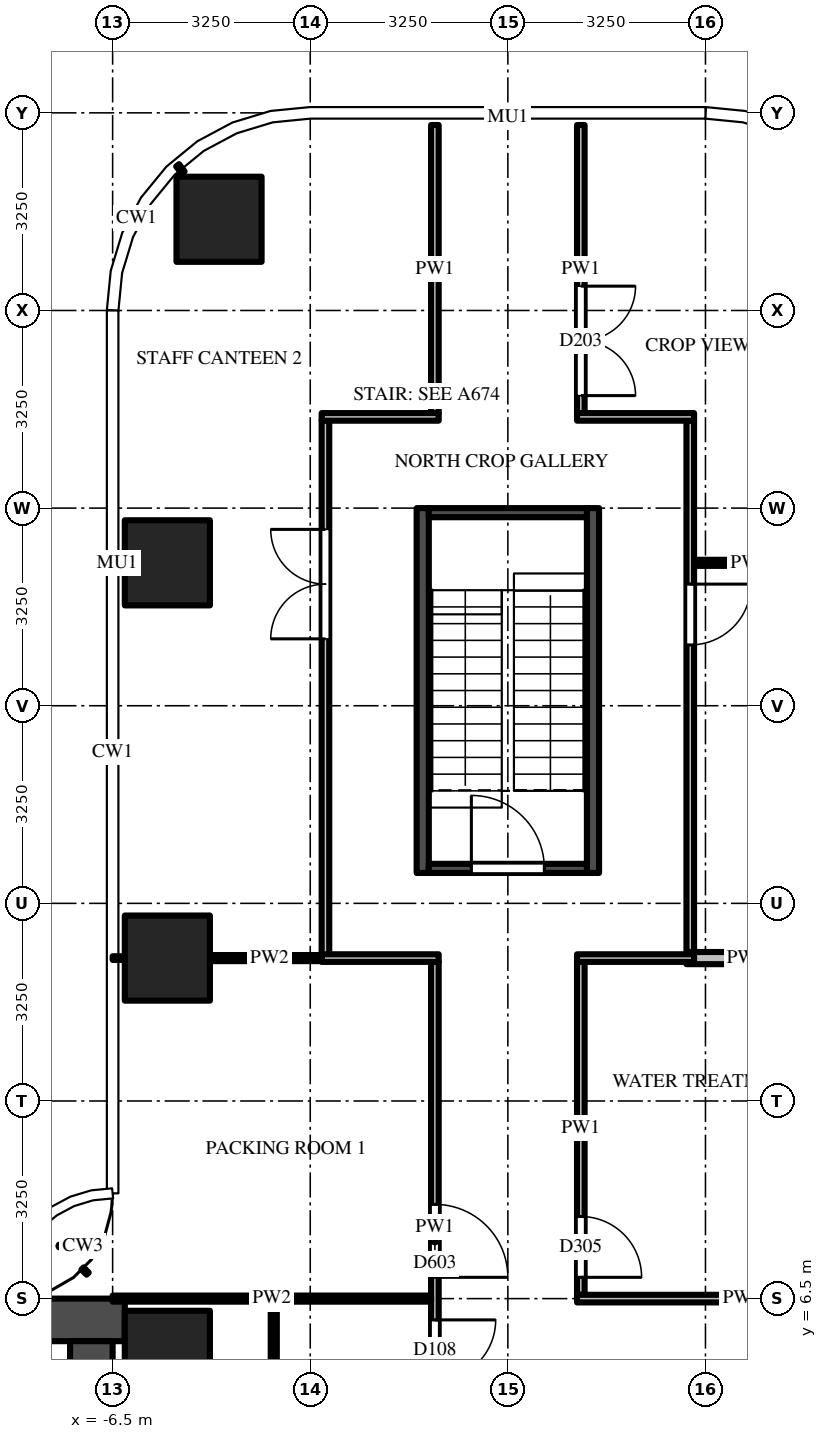
"""IFC4 building model, lengths in metres.
Left out: names, types, materials, properties, quantities, classifications, styles, units other than length and angle.
Written with IfcOpenShell. Run it as: python <this file> out.ifc"""

import sys

from ifc_helpers import new_model, si_unit, direction, frame, frame_2d, origin, origin_2d, place, context, subcontext, project, spatial, rectangle, extrude, source, transform, mapped, element, fill, save


model = new_model("IFC4")
c1 = context("Model", 3, precision=1e-05, world=origin(), true_north=direction((0.0, 1.0)))
c2 = subcontext(c1, "Body", "Model", "MODEL_VIEW")
j1 = project(units=[si_unit("LENGTHUNIT", "METRE"), si_unit("PLANEANGLEUNIT", "RADIAN")], contexts=[c1])
p1 = place(None, origin())
s1 = spatial("IfcSite", under=j1, at=p1, CompositionType="ELEMENT")
p2 = place(p1, origin())
s2 = spatial("IfcBuilding", under=s1, at=p2, CompositionType="ELEMENT")
p3 = place(p2, frame((0.0, 0.0, 79.0)))
s3 = spatial("IfcBuildingStorey", under=s2, at=p3, CompositionType="ELEMENT", Elevation=79.0)
m1 = source(origin(), c2, "Body", "SweptSolid", [
    extrude(rectangle(XDim=1.4, YDim=1.4, at=origin_2d()), origin(), (0.0, 0.0, 1.0), 4.5),
])
for number, where, z_axis, x_axis in (
    (1, (-5.6, 12.1, 0.0), (0.0, 0.0, 1.0), (1.0, 0.0, 0.0)),
    (2, (-5.6, 18.6, 0.0), (0.0, 0.0, 1.0), (1.0, 0.0, 0.0)),
    (3, (-4.75, 24.25, 0.0), (0.0, 0.0, 1.0), (1.0, 0.0, 0.0)),
    (4, (-5.6, 5.6, 0.0), (0.0, 0.0, 1.0), (1.0, 0.0, 0.0)),
):
    element("IfcColumn", number, at=place(p3, frame(where, z_axis=z_axis, x_axis=x_axis)), inside=s3, PredefinedType="COLUMN", context=c2, shape_type="MappedRepresentation", body=[
        mapped(m1, transform((0.0, 0.0, 0.0))),
    ])
m2 = source(origin(), c2, "Body", "SweptSolid", [
    extrude(rectangle(XDim=16.45, YDim=0.7, at=frame_2d((8.225, 0.0))), origin(), (0.0, 0.0, 1.0), 4.25),
])
p4 = place(p3, frame((-6.3, 6.15, 0.0), z_axis=(0.0, 0.0, 1.0), x_axis=(-1.0, 0.0, 0.0)))
e5 = element("IfcWall", 5, at=p4, inside=s3, PredefinedType="SHEAR", context=c2, shape_type="MappedRepresentation", body=[
    mapped(m2, transform((0.0, 0.0, 0.0))),
])
m3 = source(origin(), c2, "Body", "SweptSolid", [
    extrude(rectangle(XDim=9.05, YDim=0.7, at=frame_2d((4.525, 0.0))), origin(), (0.0, 0.0, 1.0), 4.25),
])
p5 = place(p3, frame((-6.85, 5.8, 0.0), z_axis=(0.0, 0.0, 1.0), x_axis=(0.0, -1.0, 0.0)))
e6 = element("IfcWall", 6, at=p5, inside=s3, PredefinedType="SHEAR", context=c2, shape_type="MappedRepresentation", body=[
    mapped(m3, transform((0.0, 0.0, 0.0))),
])
m4 = source(origin(), c2, "Body", "SweptSolid", [
    extrude(rectangle(XDim=1.8, YDim=2.1, at=frame_2d((0.9, 1.05))), frame((0.0, 0.36, 0.0), z_axis=(0.0, -1.0, 0.0), x_axis=(1.0, 0.0, 0.0)), (0.0, 0.0, 1.0), 0.72),
])
p6 = place(p5, frame((3.15, 0.0, 0.0)))
e7 = element("IfcOpeningElement", 7, at=p6, cuts=e6, PredefinedType="OPENING", context=c2, shape_type="MappedRepresentation", body=[
    mapped(m4, transform((0.0, 0.0, 0.0))),
])
m5 = source(origin(), c2, "Body", "SweptSolid", [
    extrude(rectangle(XDim=6.0, YDim=0.2, at=frame_2d((3.0, 0.0))), origin(), (0.0, 0.0, 1.0), 4.25),
])
for number, where, z_axis, x_axis in (
    (8, (-1.4, 13.5, 0.0), (0.0, 0.0, 1.0), (0.0, 1.0, 0.0)),
    (9, (1.4, 13.5, 0.0), (0.0, 0.0, 1.0), (0.0, 1.0, 0.0)),
):
    element("IfcWall", number, at=place(p3, frame(where, z_axis=z_axis, x_axis=x_axis)), inside=s3, PredefinedType="SHEAR", context=c2, shape_type="MappedRepresentation", body=[
        mapped(m5, transform((0.0, 0.0, 0.0))),
    ])
m6 = source(origin(), c2, "Body", "SweptSolid", [
    extrude(rectangle(XDim=2.6, YDim=0.15, at=frame_2d((1.3, 0.0))), origin(), (0.0, 0.0, 1.0), 4.25),
])
p7 = place(p3, frame((-1.3, 13.575, 0.0), z_axis=(0.0, 0.0, 1.0), x_axis=(1.0, 0.0, 0.0)))
e10 = element("IfcWall", 10, at=p7, inside=s3, PredefinedType="SHEAR", context=c2, shape_type="MappedRepresentation", body=[
    mapped(m6, transform((0.0, 0.0, 0.0))),
])
m7 = source(origin(), c2, "Body", "SweptSolid", [
    extrude(rectangle(XDim=1.2, YDim=2.1, at=frame_2d((0.6, 1.05))), frame((0.0, 0.085, 0.0), z_axis=(0.0, -1.0, 0.0), x_axis=(1.0, 0.0, 0.0)), (0.0, 0.0, 1.0), 0.17),
])
p8 = place(p7, frame((0.7, 0.0, 0.0)))
e11 = element("IfcOpeningElement", 11, at=p8, cuts=e10, PredefinedType="OPENING", context=c2, shape_type="MappedRepresentation", body=[
    mapped(m7, transform((0.0, 0.0, 0.0))),
])
p9 = place(p3, frame((-1.3, 19.425, 0.0), z_axis=(0.0, 0.0, 1.0), x_axis=(1.0, 0.0, 0.0)))
e12 = element("IfcWall", 12, at=p9, inside=s3, PredefinedType="SHEAR", context=c2, shape_type="MappedRepresentation", body=[
    mapped(m6, transform((0.0, 0.0, 0.0))),
])
m8 = source(origin(), c2, "Body", "SweptSolid", [
    extrude(rectangle(XDim=3.137, YDim=0.1, at=frame_2d((1.569, 0.0))), origin(), (0.0, 0.0, 1.0), 3.468),
])
p10 = place(p3, frame((-3.85, 3.312, 0.0), z_axis=(0.0, 0.0, 1.0), x_axis=(0.0, 1.0, 0.0)))
e13 = element("IfcWall", 13, at=p10, inside=s3, PredefinedType="PARTITIONING", context=c2, shape_type="MappedRepresentation", body=[
    mapped(m8, transform((0.0, 0.0, 0.0))),
])
m9 = source(origin(), c2, "Body", "SweptSolid", [
    extrude(rectangle(XDim=8.788, YDim=0.125, at=frame_2d((4.394, 0.0))), origin(), (0.0, 0.0, 1.0), 3.468),
])
p11 = place(p3, frame((-3.0, 12.15, 0.0), z_axis=(0.0, 0.0, 1.0), x_axis=(0.0, 1.0, 0.0)))
e14 = element("IfcWall", 14, at=p11, inside=s3, PredefinedType="PARTITIONING", context=c2, shape_type="MappedRepresentation", body=[
    mapped(m9, transform((0.0, 0.0, 0.0))),
])
m10 = source(origin(), c2, "Body", "SweptSolid", [
    extrude(rectangle(XDim=1.8, YDim=2.1, at=frame_2d((0.9, 1.05))), frame((0.0, 0.073, 0.0), z_axis=(0.0, -1.0, 0.0), x_axis=(1.0, 0.0, 0.0)), (0.0, 0.0, 1.0), 0.145),
])
p12 = place(p11, frame((5.2, 0.0, 0.0)))
e15 = element("IfcOpeningElement", 15, at=p12, cuts=e14, PredefinedType="OPENING", context=c2, shape_type="MappedRepresentation", body=[
    mapped(m10, transform((0.0, 0.0, 0.0))),
])
m11 = source(origin(), c2, "Body", "SweptSolid", [
    extrude(rectangle(XDim=8.725, YDim=0.125, at=frame_2d((4.363, 0.0))), origin(), (0.0, 0.0, 1.0), 3.468),
])
p13 = place(p3, frame((-1.2, 12.038, 0.0), z_axis=(0.0, 0.0, 1.0), x_axis=(0.0, -1.0, 0.0)))
e16 = element("IfcWall", 16, at=p13, inside=s3, PredefinedType="PARTITIONING", context=c2, shape_type="MappedRepresentation", body=[
    mapped(m11, transform((0.0, 0.0, 0.0))),
])
m12 = source(origin(), c2, "Body", "SweptSolid", [
    extrude(rectangle(XDim=1.0, YDim=2.1, at=frame_2d((0.5, 1.05))), frame((0.0, 0.073, 0.0), z_axis=(0.0, -1.0, 0.0), x_axis=(1.0, 0.0, 0.0)), (0.0, 0.0, 1.0), 0.145),
])
p14 = place(p13, frame((5.887, 0.0, 0.0)))
e17 = element("IfcOpeningElement", 17, at=p14, cuts=e16, PredefinedType="OPENING", context=c2, shape_type="MappedRepresentation", body=[
    mapped(m12, transform((0.0, 0.0, 0.0))),
])
m13 = source(origin(), c2, "Body", "SweptSolid", [
    extrude(rectangle(XDim=1.2, YDim=2.1, at=frame_2d((0.6, 1.05))), frame((0.0, 0.073, 0.0), z_axis=(0.0, -1.0, 0.0), x_axis=(1.0, 0.0, 0.0)), (0.0, 0.0, 1.0), 0.145),
])
p15 = place(p13, frame((3.988, 0.0, 0.0)))
e18 = element("IfcOpeningElement", 18, at=p15, cuts=e16, PredefinedType="OPENING", context=c2, shape_type="MappedRepresentation", body=[
    mapped(m13, transform((0.0, 0.0, 0.0))),
])
m14 = source(origin(), c2, "Body", "SweptSolid", [
    extrude(rectangle(XDim=4.738, YDim=0.125, at=frame_2d((2.369, 0.0))), origin(), (0.0, 0.0, 1.0), 3.33),
])
p16 = place(p3, frame((-1.2, 25.8, 0.0), z_axis=(0.0, 0.0, 1.0), x_axis=(0.0, -1.0, 0.0)))
e19 = element("IfcWall", 19, at=p16, inside=s3, PredefinedType="PARTITIONING", context=c2, shape_type="MappedRepresentation", body=[
    mapped(m14, transform((0.0, 0.0, 0.0))),
])
m15 = source(origin(), c2, "Body", "SweptSolid", [
    extrude(rectangle(XDim=5.475, YDim=0.125, at=frame_2d((2.738, 0.0))), origin(), (0.0, 0.0, 1.0), 3.468),
])
p17 = place(p3, frame((1.2, 12.038, 0.0), z_axis=(0.0, 0.0, 1.0), x_axis=(0.0, -1.0, 0.0)))
e20 = element("IfcWall", 20, at=p17, inside=s3, PredefinedType="PARTITIONING", context=c2, shape_type="MappedRepresentation", body=[
    mapped(m15, transform((0.0, 0.0, 0.0))),
])
p18 = place(p17, frame((4.188, 0.0, 0.0)))
e21 = element("IfcOpeningElement", 21, at=p18, cuts=e20, PredefinedType="OPENING", context=c2, shape_type="MappedRepresentation", body=[
    mapped(m12, transform((0.0, 0.0, 0.0))),
])
p19 = place(p3, frame((1.2, 25.8, 0.0), z_axis=(0.0, 0.0, 1.0), x_axis=(0.0, -1.0, 0.0)))
e22 = element("IfcWall", 22, at=p19, inside=s3, PredefinedType="PARTITIONING", context=c2, shape_type="MappedRepresentation", body=[
    mapped(m14, transform((0.0, 0.0, 0.0))),
])
p20 = place(p19, frame((2.65, 0.0, 0.0)))
e23 = element("IfcOpeningElement", 23, at=p20, cuts=e22, PredefinedType="OPENING", context=c2, shape_type="MappedRepresentation", body=[
    mapped(m10, transform((0.0, 0.0, 0.0))),
])
m16 = source(origin(), c2, "Body", "SweptSolid", [
    extrude(rectangle(XDim=8.738, YDim=0.125, at=frame_2d((4.369, 0.0))), origin(), (0.0, 0.0, 1.0), 3.468),
])
p21 = place(p3, frame((3.0, 20.938, 0.0), z_axis=(0.0, 0.0, 1.0), x_axis=(0.0, -1.0, 0.0)))
e24 = element("IfcWall", 24, at=p21, inside=s3, PredefinedType="PARTITIONING", context=c2, shape_type="MappedRepresentation", body=[
    mapped(m16, transform((0.0, 0.0, 0.0))),
])
p22 = place(p21, frame((2.688, 0.0, 0.0)))
e25 = element("IfcOpeningElement", 25, at=p22, cuts=e24, PredefinedType="OPENING", context=c2, shape_type="MappedRepresentation", body=[
    mapped(m12, transform((0.0, 0.0, 0.0))),
])
m17 = source(origin(), c2, "Body", "SweptSolid", [
    extrude(rectangle(XDim=5.238, YDim=0.1, at=frame_2d((2.619, 0.0))), origin(), (0.0, 0.0, 1.0), 3.33),
])
p23 = place(p3, frame((-6.5, 6.5, 0.0), z_axis=(0.0, 0.0, 1.0), x_axis=(1.0, 0.0, 0.0)))
e26 = element("IfcWall", 26, at=p23, inside=s3, PredefinedType="PARTITIONING", context=c2, shape_type="MappedRepresentation", body=[
    mapped(m17, transform((0.0, 0.0, 0.0))),
])
m18 = source(origin(), c2, "Body", "SweptSolid", [
    extrude(rectangle(XDim=5.425, YDim=0.125, at=frame_2d((2.712, 0.0))), origin(), (0.0, 0.0, 1.0), 3.33),
])
p24 = place(p3, frame((1.137, 6.5, 0.0), z_axis=(0.0, 0.0, 1.0), x_axis=(1.0, 0.0, 0.0)))
e27 = element("IfcWall", 27, at=p24, inside=s3, PredefinedType="PARTITIONING", context=c2, shape_type="MappedRepresentation", body=[
    mapped(m18, transform((0.0, 0.0, 0.0))),
])
m19 = source(origin(), c2, "Body", "SweptSolid", [
    extrude(rectangle(XDim=1.962, YDim=0.2, at=frame_2d((0.981, 0.0))), origin(), (0.0, 0.0, 1.0), 3.468),
])
p25 = place(p3, frame((2.938, 12.1, 0.0), z_axis=(0.0, 0.0, 1.0), x_axis=(1.0, 0.0, 0.0)))
e28 = element("IfcWall", 28, at=p25, inside=s3, PredefinedType="PARTITIONING", context=c2, shape_type="MappedRepresentation", body=[
    mapped(m19, transform((0.0, 0.0, 0.0))),
])
m20 = source(origin(), c2, "Body", "SweptSolid", [
    extrude(rectangle(XDim=1.962, YDim=0.1, at=frame_2d((0.981, 0.0))), origin(), (0.0, 0.0, 1.0), 3.468),
])
p26 = place(p3, frame((-4.9, 12.1, 0.0), z_axis=(0.0, 0.0, 1.0), x_axis=(1.0, 0.0, 0.0)))
e29 = element("IfcWall", 29, at=p26, inside=s3, PredefinedType="PARTITIONING", context=c2, shape_type="MappedRepresentation", body=[
    mapped(m20, transform((0.0, 0.0, 0.0))),
])
m21 = source(origin(), c2, "Body", "SweptSolid", [
    extrude(rectangle(XDim=1.925, YDim=0.125, at=frame_2d((0.962, 0.0))), origin(), (0.0, 0.0, 1.0), 3.468),
])
for number, where, z_axis, x_axis in (
    (30, (-1.137, 12.1, 0.0), (0.0, 0.0, 1.0), (-1.0, 0.0, 0.0)),
    (31, (3.062, 12.1, 0.0), (0.0, 0.0, 1.0), (-1.0, 0.0, 0.0)),
):
    element("IfcWall", number, at=place(p3, frame(where, z_axis=z_axis, x_axis=x_axis)), inside=s3, PredefinedType="PARTITIONING", context=c2, shape_type="MappedRepresentation", body=[
        mapped(m21, transform((0.0, 0.0, 0.0))),
    ])
m22 = source(origin(), c2, "Body", "SweptSolid", [
    extrude(rectangle(XDim=1.837, YDim=0.1, at=frame_2d((0.919, 0.0))), origin(), (0.0, 0.0, 1.0), 3.697),
])
p27 = place(p3, frame((3.062, 18.6, 0.0), z_axis=(0.0, 0.0, 1.0), x_axis=(1.0, 0.0, 0.0)))
e32 = element("IfcWall", 32, at=p27, inside=s3, PredefinedType="PARTITIONING", context=c2, shape_type="MappedRepresentation", body=[
    mapped(m22, transform((0.0, 0.0, 0.0))),
])
m23 = source(origin(), c2, "Body", "SweptSolid", [
    extrude(rectangle(XDim=1.925, YDim=0.125, at=frame_2d((0.962, 0.0))), origin(), (0.0, 0.0, 1.0), 4.25),
])
for number, where, z_axis, x_axis in (
    (33, (-3.062, 21.0, 0.0), (0.0, 0.0, 1.0), (1.0, 0.0, 0.0)),
    (34, (1.137, 21.0, 0.0), (0.0, 0.0, 1.0), (1.0, 0.0, 0.0)),
):
    element("IfcWall", number, at=place(p3, frame(where, z_axis=z_axis, x_axis=x_axis)), inside=s3, PredefinedType="PARTITIONING", context=c2, shape_type="MappedRepresentation", body=[
        mapped(m23, transform((0.0, 0.0, 0.0))),
    ])
m24 = source(origin(), c2, "Body", "SweptSolid", [
    extrude(rectangle(XDim=1.2, YDim=2.1, at=frame_2d((0.6, 1.05))), frame((0.0, 0.025, 0.0), z_axis=(0.0, -1.0, 0.0), x_axis=(1.0, 0.0, 0.0)), (0.0, 0.0, 1.0), 0.05),
])
p28 = place(p8, origin())
e35 = element("IfcDoor", 35, at=p28, inside=s3, OperationType="SINGLE_SWING_LEFT", PredefinedType="DOOR", context=c2, shape_type="MappedRepresentation", body=[
    mapped(m24, transform((0.0, 0.0, 0.0))),
])
fill(e11, e35)
m25 = source(origin(), c2, "Body", "SweptSolid", [
    extrude(rectangle(XDim=1.0, YDim=2.1, at=frame_2d((0.5, 1.05))), frame((0.0, 0.025, 0.0), z_axis=(0.0, -1.0, 0.0), x_axis=(1.0, 0.0, 0.0)), (0.0, 0.0, 1.0), 0.05),
])
p29 = place(p14, origin())
e36 = element("IfcDoor", 36, at=p29, inside=s3, OperationType="SINGLE_SWING_LEFT", PredefinedType="DOOR", context=c2, shape_type="MappedRepresentation", body=[
    mapped(m25, transform((0.0, 0.0, 0.0))),
])
fill(e17, e36)
p30 = place(p18, origin())
e37 = element("IfcDoor", 37, at=p30, inside=s3, OperationType="SINGLE_SWING_RIGHT", PredefinedType="DOOR", context=c2, shape_type="MappedRepresentation", body=[
    mapped(m25, transform((0.0, 0.0, 0.0))),
])
fill(e21, e37)
p31 = place(p15, origin())
e38 = element("IfcDoor", 38, at=p31, inside=s3, OperationType="SINGLE_SWING_RIGHT", PredefinedType="DOOR", context=c2, shape_type="MappedRepresentation", body=[
    mapped(m24, transform((0.0, 0.0, 0.0))),
])
fill(e18, e38)
p32 = place(p22, origin())
e39 = element("IfcDoor", 39, at=p32, inside=s3, OperationType="SINGLE_SWING_LEFT", PredefinedType="DOOR", context=c2, shape_type="MappedRepresentation", body=[
    mapped(m25, transform((0.0, 0.0, 0.0))),
])
fill(e25, e39)
m26 = source(origin(), c2, "Body", "SweptSolid", [
    extrude(rectangle(XDim=1.8, YDim=2.1, at=frame_2d((0.9, 1.05))), frame((0.0, 0.025, 0.0), z_axis=(0.0, -1.0, 0.0), x_axis=(1.0, 0.0, 0.0)), (0.0, 0.0, 1.0), 0.05),
])
p33 = place(p12, origin())
e40 = element("IfcDoor", 40, at=p33, inside=s3, OperationType="DOUBLE_DOOR_SINGLE_SWING", PredefinedType="DOOR", context=c2, shape_type="MappedRepresentation", body=[
    mapped(m26, transform((0.0, 0.0, 0.0))),
])
fill(e15, e40)
p34 = place(p20, origin())
e41 = element("IfcDoor", 41, at=p34, inside=s3, OperationType="DOUBLE_DOOR_SINGLE_SWING", PredefinedType="DOOR", context=c2, shape_type="MappedRepresentation", body=[
    mapped(m26, transform((0.0, 0.0, 0.0))),
])
fill(e23, e41)
save(model, sys.argv[1])
